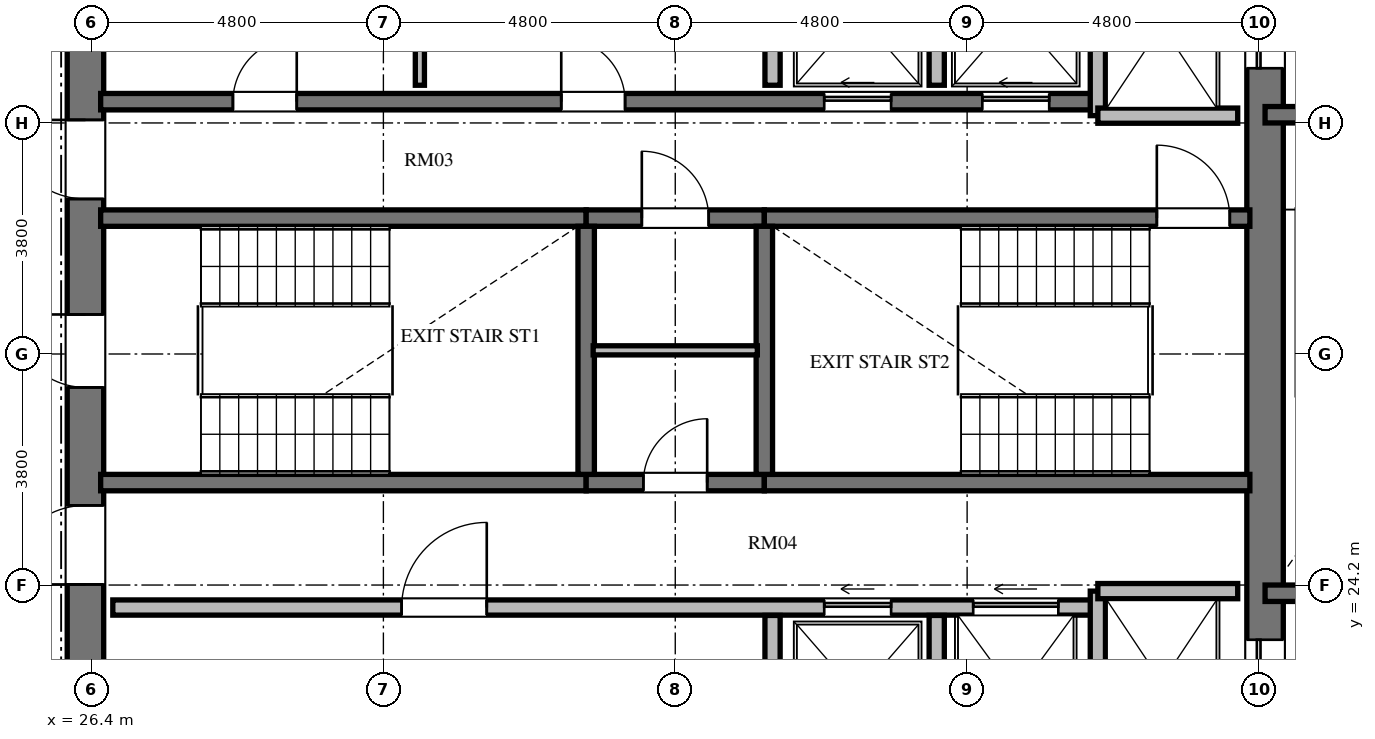
"""IFC4 building model, lengths in metres.
Left out: names, types, materials, properties, quantities, classifications, styles, units other than length and angle.
Written with IfcOpenShell. Run it as: python <this file> out.ifc"""

import sys

from ifc_helpers import new_model, si_unit, direction, frame, frame_2d, origin, place, context, subcontext, project, spatial, rectangle, extrude, element, fill, save


model = new_model("IFC4")
c1 = context("Model", 3, precision=1e-05, world=origin(), true_north=direction((0.0, 1.0)))
c2 = subcontext(c1, "Body", "Model", "MODEL_VIEW")
j1 = project(units=[si_unit("LENGTHUNIT", "METRE"), si_unit("PLANEANGLEUNIT", "RADIAN")], contexts=[c1])
p1 = place(None, origin())
s1 = spatial("IfcSite", under=j1, at=p1, CompositionType="ELEMENT")
p2 = place(p1, origin())
s2 = spatial("IfcBuilding", under=s1, at=p2, CompositionType="ELEMENT")
p3 = place(p2, frame((0.0, 0.0, 224.016)))
s3 = spatial("IfcBuildingStorey", under=s2, at=p3, CompositionType="ELEMENT", Elevation=224.016)
p4 = place(p3, frame((26.3, 20.95, 0.0), z_axis=(0.0, 0.0, 1.0), x_axis=(0.0, 1.0, 0.0)))
e1 = element("IfcWall", 1, at=p4, inside=s3, PredefinedType="SHEAR", context=c2, shape_type="SweptSolid", body=[
    extrude(rectangle(XDim=14.1, YDim=0.6, at=frame_2d((7.05, 0.0))), origin(), (0.0, 0.0, 1.0), 3.648),
])
p5 = place(p4, frame((6.5, 0.0, 0.0)))
e2 = element("IfcOpeningElement", 2, at=p5, cuts=e1, PredefinedType="OPENING", context=c2, shape_type="SweptSolid", body=[
    extrude(rectangle(XDim=1.2, YDim=2.15, at=frame_2d((0.6, 1.075))), frame((0.0, 0.31, 0.0), z_axis=(0.0, -1.0, 0.0), x_axis=(1.0, 0.0, 0.0)), (0.0, 0.0, 1.0), 0.62),
])
p6 = place(p4, frame((9.6, 0.0, 0.0)))
e3 = element("IfcOpeningElement", 3, at=p6, cuts=e1, PredefinedType="OPENING", context=c2, shape_type="SweptSolid", body=[
    extrude(rectangle(XDim=1.3, YDim=2.2, at=frame_2d((0.65, 1.1))), frame((0.0, 0.31, 0.0), z_axis=(0.0, -1.0, 0.0), x_axis=(1.0, 0.0, 0.0)), (0.0, 0.0, 1.0), 0.62),
])
p7 = place(p4, frame((3.26, 0.0, 0.0)))
e4 = element("IfcOpeningElement", 4, at=p7, cuts=e1, PredefinedType="OPENING", context=c2, shape_type="SweptSolid", body=[
    extrude(rectangle(XDim=1.3, YDim=2.2, at=frame_2d((0.65, 1.1))), frame((0.0, 0.31, 0.0), z_axis=(0.0, -1.0, 0.0), x_axis=(1.0, 0.0, 0.0)), (0.0, 0.0, 1.0), 0.62),
])
p8 = place(p3, frame((45.7, 20.95, 0.0), z_axis=(0.0, 0.0, 1.0), x_axis=(0.0, 1.0, 0.0)))
e5 = element("IfcWall", 5, at=p8, inside=s3, PredefinedType="SHEAR", context=c2, shape_type="SweptSolid", body=[
    extrude(rectangle(XDim=14.1, YDim=0.6, at=frame_2d((7.05, 0.0))), origin(), (0.0, 0.0, 1.0), 3.648),
])
p9 = place(p8, frame((11.75, 0.0, 0.0)))
e6 = element("IfcOpeningElement", 6, at=p9, cuts=e5, PredefinedType="OPENING", context=c2, shape_type="SweptSolid", body=[
    extrude(rectangle(XDim=1.4, YDim=2.3, at=frame_2d((0.7, 1.15))), frame((0.0, 0.31, 0.0), z_axis=(0.0, -1.0, 0.0), x_axis=(1.0, 0.0, 0.0)), (0.0, 0.0, 1.0), 0.62),
])
p10 = place(p8, frame((0.95, 0.0, 0.0)))
e7 = element("IfcOpeningElement", 7, at=p10, cuts=e5, PredefinedType="OPENING", context=c2, shape_type="SweptSolid", body=[
    extrude(rectangle(XDim=1.4, YDim=2.3, at=frame_2d((0.7, 1.15))), frame((0.0, 0.31, 0.0), z_axis=(0.0, -1.0, 0.0), x_axis=(1.0, 0.0, 0.0)), (0.0, 0.0, 1.0), 0.62),
])
p11 = place(p3, frame((26.55, 30.235, 0.0), z_axis=(0.0, 0.0, 1.0), x_axis=(1.0, 0.0, 0.0)))
e8 = element("IfcWall", 8, at=p11, inside=s3, PredefinedType="SHEAR", context=c2, shape_type="SweptSolid", body=[
    extrude(rectangle(XDim=7.985, YDim=0.27, at=frame_2d((3.992, 0.0))), origin(), (0.0, 0.0, 1.0), 3.648),
])
p12 = place(p3, frame((34.535, 30.235, 0.0), z_axis=(0.0, 0.0, 1.0), x_axis=(1.0, 0.0, 0.0)))
e9 = element("IfcWall", 9, at=p12, inside=s3, PredefinedType="SHEAR", context=c2, shape_type="SweptSolid", body=[
    extrude(rectangle(XDim=2.93, YDim=0.27, at=frame_2d((1.465, 0.0))), origin(), (0.0, 0.0, 1.0), 3.648),
])
p13 = place(p12, frame((0.915, 0.0, 0.0)))
e10 = element("IfcOpeningElement", 10, at=p13, cuts=e9, PredefinedType="OPENING", context=c2, shape_type="SweptSolid", body=[
    extrude(rectangle(XDim=1.1, YDim=2.15, at=frame_2d((0.55, 1.075))), frame((0.0, 0.145, 0.0), z_axis=(0.0, -1.0, 0.0), x_axis=(1.0, 0.0, 0.0)), (0.0, 0.0, 1.0), 0.29),
])
p14 = place(p3, frame((37.465, 30.235, 0.0), z_axis=(0.0, 0.0, 1.0), x_axis=(1.0, 0.0, 0.0)))
e11 = element("IfcWall", 11, at=p14, inside=s3, PredefinedType="SHEAR", context=c2, shape_type="SweptSolid", body=[
    extrude(rectangle(XDim=7.985, YDim=0.27, at=frame_2d((3.992, 0.0))), origin(), (0.0, 0.0, 1.0), 3.648),
])
p15 = place(p14, frame((6.455, 0.0, 0.0)))
e12 = element("IfcOpeningElement", 12, at=p15, cuts=e11, PredefinedType="OPENING", context=c2, shape_type="SweptSolid", body=[
    extrude(rectangle(XDim=1.2, YDim=2.15, at=frame_2d((0.6, 1.075))), frame((0.0, 0.145, 0.0), z_axis=(0.0, -1.0, 0.0), x_axis=(1.0, 0.0, 0.0)), (0.0, 0.0, 1.0), 0.29),
])
p16 = place(p3, frame((26.55, 25.885, 0.0), z_axis=(0.0, 0.0, 1.0), x_axis=(1.0, 0.0, 0.0)))
e13 = element("IfcWall", 13, at=p16, inside=s3, PredefinedType="SHEAR", context=c2, shape_type="SweptSolid", body=[
    extrude(rectangle(XDim=7.985, YDim=0.27, at=frame_2d((3.992, 0.0))), origin(), (0.0, 0.0, 1.0), 3.648),
])
p17 = place(p3, frame((34.535, 25.885, 0.0), z_axis=(0.0, 0.0, 1.0), x_axis=(1.0, 0.0, 0.0)))
e14 = element("IfcWall", 14, at=p17, inside=s3, PredefinedType="SHEAR", context=c2, shape_type="SweptSolid", body=[
    extrude(rectangle(XDim=2.93, YDim=0.27, at=frame_2d((1.465, 0.0))), origin(), (0.0, 0.0, 1.0), 3.648),
])
p18 = place(p17, frame((0.94, 0.0, 0.0)))
e15 = element("IfcOpeningElement", 15, at=p18, cuts=e14, PredefinedType="OPENING", context=c2, shape_type="SweptSolid", body=[
    extrude(rectangle(XDim=1.05, YDim=2.15, at=frame_2d((0.525, 1.075))), frame((0.0, 0.145, 0.0), z_axis=(0.0, -1.0, 0.0), x_axis=(1.0, 0.0, 0.0)), (0.0, 0.0, 1.0), 0.29),
])
p19 = place(p3, frame((37.465, 25.885, 0.0), z_axis=(0.0, 0.0, 1.0), x_axis=(1.0, 0.0, 0.0)))
e16 = element("IfcWall", 16, at=p19, inside=s3, PredefinedType="SHEAR", context=c2, shape_type="SweptSolid", body=[
    extrude(rectangle(XDim=7.985, YDim=0.27, at=frame_2d((3.992, 0.0))), origin(), (0.0, 0.0, 1.0), 3.648),
])
for number, where, z_axis, x_axis in (
    (17, (34.535, 26.02, 0.0), (0.0, 0.0, 1.0), (0.0, 1.0, 0.0)),
    (18, (37.465, 26.02, 0.0), (0.0, 0.0, 1.0), (0.0, 1.0, 0.0)),
):
    element("IfcWall", number, at=place(p3, frame(where, z_axis=z_axis, x_axis=x_axis)), inside=s3, PredefinedType="SHEAR", context=c2, shape_type="SweptSolid", body=[
        extrude(rectangle(XDim=4.08, YDim=0.27, at=frame_2d((2.04, 0.0))), origin(), (0.0, 0.0, 1.0), 3.648),
    ])
p20 = place(p3, frame((34.65, 28.06, 0.0), z_axis=(0.0, 0.0, 1.0), x_axis=(1.0, 0.0, 0.0)))
e19 = element("IfcWall", 19, at=p20, inside=s3, PredefinedType="PARTITIONING", context=c2, shape_type="SweptSolid", body=[
    extrude(rectangle(XDim=2.7, YDim=0.15, at=frame_2d((1.35, 0.0))), origin(), (0.0, 0.0, 1.0), 3.448),
])
p21 = place(p3, frame((26.55, 32.15, 0.0), z_axis=(0.0, 0.0, 1.0), x_axis=(1.0, 0.0, 0.0)))
e20 = element("IfcWall", 20, at=p21, inside=s3, PredefinedType="SHEAR", context=c2, shape_type="SweptSolid", body=[
    extrude(rectangle(XDim=16.4, YDim=0.27, at=frame_2d((8.2, 0.0))), origin(), (0.0, 0.0, 1.0), 3.648),
])
p22 = place(p21, frame((2.175, 0.0, 0.0)))
e21 = element("IfcOpeningElement", 21, at=p22, cuts=e20, PredefinedType="OPENING", context=c2, shape_type="SweptSolid", body=[
    extrude(rectangle(XDim=1.05, YDim=2.15, at=frame_2d((0.525, 1.075))), frame((0.0, 0.145, 0.0), z_axis=(0.0, -1.0, 0.0), x_axis=(1.0, 0.0, 0.0)), (0.0, 0.0, 1.0), 0.29),
])
p23 = place(p21, frame((7.575, 0.0, 0.0)))
e22 = element("IfcOpeningElement", 22, at=p23, cuts=e20, PredefinedType="OPENING", context=c2, shape_type="SweptSolid", body=[
    extrude(rectangle(XDim=1.05, YDim=2.15, at=frame_2d((0.525, 1.075))), frame((0.0, 0.145, 0.0), z_axis=(0.0, -1.0, 0.0), x_axis=(1.0, 0.0, 0.0)), (0.0, 0.0, 1.0), 0.29),
])
p24 = place(p21, frame((11.9, 0.0, 0.0)))
e23 = element("IfcOpeningElement", 23, at=p24, cuts=e20, PredefinedType="OPENING", context=c2, shape_type="SweptSolid", body=[
    extrude(rectangle(XDim=1.1, YDim=2.2, at=frame_2d((0.55, 1.1))), frame((0.0, 0.145, 0.0), z_axis=(0.0, -1.0, 0.0), x_axis=(1.0, 0.0, 0.0)), (0.0, 0.0, 1.0), 0.29),
])
p25 = place(p21, frame((14.5, 0.0, 0.0)))
e24 = element("IfcOpeningElement", 24, at=p25, cuts=e20, PredefinedType="OPENING", context=c2, shape_type="SweptSolid", body=[
    extrude(rectangle(XDim=1.1, YDim=2.2, at=frame_2d((0.55, 1.1))), frame((0.0, 0.145, 0.0), z_axis=(0.0, -1.0, 0.0), x_axis=(1.0, 0.0, 0.0)), (0.0, 0.0, 1.0), 0.29),
])
p26 = place(p3, frame((26.75, 23.83, 0.0), z_axis=(0.0, 0.0, 1.0), x_axis=(1.0, 0.0, 0.0)))
e25 = element("IfcWall", 25, at=p26, inside=s3, PredefinedType="SOLIDWALL", context=c2, shape_type="SweptSolid", body=[
    extrude(rectangle(XDim=16.2, YDim=0.25, at=frame_2d((8.1, 0.0))), origin(), (0.0, 0.0, 1.0), 3.448),
])
p27 = place(p26, frame((4.75, 0.0, 0.0)))
e26 = element("IfcOpeningElement", 26, at=p27, cuts=e25, PredefinedType="OPENING", context=c2, shape_type="SweptSolid", body=[
    extrude(rectangle(XDim=1.4, YDim=2.2, at=frame_2d((0.7, 1.1))), frame((0.0, 0.135, 0.0), z_axis=(0.0, -1.0, 0.0), x_axis=(1.0, 0.0, 0.0)), (0.0, 0.0, 1.0), 0.27),
])
p28 = place(p26, frame((11.7, 0.0, 0.0)))
e27 = element("IfcOpeningElement", 27, at=p28, cuts=e25, PredefinedType="OPENING", context=c2, shape_type="SweptSolid", body=[
    extrude(rectangle(XDim=1.1, YDim=2.2, at=frame_2d((0.55, 1.1))), frame((0.0, 0.135, 0.0), z_axis=(0.0, -1.0, 0.0), x_axis=(1.0, 0.0, 0.0)), (0.0, 0.0, 1.0), 0.27),
])
p29 = place(p26, frame((14.15, 0.0, 0.0)))
e28 = element("IfcOpeningElement", 28, at=p29, cuts=e25, PredefinedType="OPENING", context=c2, shape_type="SweptSolid", body=[
    extrude(rectangle(XDim=1.4, YDim=2.3, at=frame_2d((0.7, 1.15))), frame((0.0, 0.135, 0.0), z_axis=(0.0, -1.0, 0.0), x_axis=(1.0, 0.0, 0.0)), (0.0, 0.0, 1.0), 0.27),
])
p30 = place(p3, frame((42.95, 31.92, 0.0), z_axis=(0.0, 0.0, 1.0), x_axis=(0.0, 1.0, 0.0)))
e29 = element("IfcWall", 29, at=p30, inside=s3, PredefinedType="SOLIDWALL", context=c2, shape_type="SweptSolid", body=[
    extrude(rectangle(XDim=3.18, YDim=0.25, at=frame_2d((1.59, 0.0))), origin(), (0.0, 0.0, 1.0), 3.448),
])
p31 = place(p3, frame((42.95, 31.92, 0.0), z_axis=(0.0, 0.0, 1.0), x_axis=(1.0, 0.0, 0.0)))
e30 = element("IfcWall", 30, at=p31, inside=s3, PredefinedType="SOLIDWALL", context=c2, shape_type="SweptSolid", body=[
    extrude(rectangle(XDim=2.3, YDim=0.25, at=frame_2d((1.15, 0.0))), origin(), (0.0, 0.0, 1.0), 3.448),
])
p32 = place(p3, frame((42.95, 20.9, 0.0), z_axis=(0.0, 0.0, 1.0), x_axis=(0.0, 1.0, 0.0)))
e31 = element("IfcWall", 31, at=p32, inside=s3, PredefinedType="SOLIDWALL", context=c2, shape_type="SweptSolid", body=[
    extrude(rectangle(XDim=3.2, YDim=0.25, at=frame_2d((1.6, 0.0))), origin(), (0.0, 0.0, 1.0), 3.448),
])
p33 = place(p3, frame((42.95, 24.1, 0.0), z_axis=(0.0, 0.0, 1.0), x_axis=(1.0, 0.0, 0.0)))
e32 = element("IfcWall", 32, at=p33, inside=s3, PredefinedType="SOLIDWALL", context=c2, shape_type="SweptSolid", body=[
    extrude(rectangle(XDim=2.3, YDim=0.25, at=frame_2d((1.15, 0.0))), origin(), (0.0, 0.0, 1.0), 3.448),
])
p34 = place(p3, frame((37.6, 32.42, 0.0), z_axis=(0.0, 0.0, 1.0), x_axis=(0.0, 1.0, 0.0)))
e33 = element("IfcWall", 33, at=p34, inside=s3, PredefinedType="SOLIDWALL", context=c2, shape_type="SweptSolid", body=[
    extrude(rectangle(XDim=2.68, YDim=0.25, at=frame_2d((1.34, 0.0))), origin(), (0.0, 0.0, 1.0), 3.448),
])
p35 = place(p3, frame((37.6, 20.9, 0.0), z_axis=(0.0, 0.0, 1.0), x_axis=(0.0, 1.0, 0.0)))
e34 = element("IfcWall", 34, at=p35, inside=s3, PredefinedType="SOLIDWALL", context=c2, shape_type="SweptSolid", body=[
    extrude(rectangle(XDim=2.8, YDim=0.25, at=frame_2d((1.4, 0.0))), origin(), (0.0, 0.0, 1.0), 3.448),
])
p36 = place(p3, frame((40.3, 32.42, 0.0), z_axis=(0.0, 0.0, 1.0), x_axis=(0.0, 1.0, 0.0)))
e35 = element("IfcWall", 35, at=p36, inside=s3, PredefinedType="SOLIDWALL", context=c2, shape_type="SweptSolid", body=[
    extrude(rectangle(XDim=2.68, YDim=0.25, at=frame_2d((1.34, 0.0))), origin(), (0.0, 0.0, 1.0), 3.448),
])
p37 = place(p3, frame((40.3, 20.9, 0.0), z_axis=(0.0, 0.0, 1.0), x_axis=(0.0, 1.0, 0.0)))
e36 = element("IfcWall", 36, at=p37, inside=s3, PredefinedType="SOLIDWALL", context=c2, shape_type="SweptSolid", body=[
    extrude(rectangle(XDim=2.8, YDim=0.25, at=frame_2d((1.4, 0.0))), origin(), (0.0, 0.0, 1.0), 3.448),
])
p38 = place(p3, frame((31.8, 32.42, 0.0), z_axis=(0.0, 0.0, 1.0), x_axis=(0.0, 1.0, 0.0)))
e37 = element("IfcWall", 37, at=p38, inside=s3, PredefinedType="PARTITIONING", context=c2, shape_type="SweptSolid", body=[
    extrude(rectangle(XDim=2.68, YDim=0.15, at=frame_2d((1.34, 0.0))), origin(), (0.0, 0.0, 1.0), 3.448),
])
for number, where, z_axis, x_axis in (
    (38, (45.7, 31.935, 0.0), (0.0, 0.0, 1.0), (1.0, 0.0, 0.0)),
    (39, (45.7, 24.065, 0.0), (0.0, 0.0, 1.0), (1.0, 0.0, 0.0)),
):
    element("IfcWall", number, at=place(p3, frame(where, z_axis=z_axis, x_axis=x_axis)), inside=s3, PredefinedType="SHEAR", context=c2, shape_type="SweptSolid", body=[
        extrude(rectangle(XDim=4.715, YDim=0.27, at=frame_2d((2.357, 0.0))), origin(), (0.0, 0.0, 1.0), 3.648),
    ])
p39 = place(p5, origin())
e40 = element("IfcDoor", 40, at=p39, inside=s3, OperationType="SINGLE_SWING_RIGHT", PredefinedType="DOOR", context=c2, shape_type="SweptSolid", body=[
    extrude(rectangle(XDim=1.2, YDim=2.15, at=frame_2d((0.6, 1.075))), frame((0.0, 0.025, 0.0), z_axis=(0.0, -1.0, 0.0), x_axis=(1.0, 0.0, 0.0)), (0.0, 0.0, 1.0), 0.05),
])
fill(e2, e40)
p40 = place(p15, origin())
e41 = element("IfcDoor", 41, at=p40, inside=s3, OperationType="SINGLE_SWING_LEFT", PredefinedType="DOOR", context=c2, shape_type="SweptSolid", body=[
    extrude(rectangle(XDim=1.2, YDim=2.15, at=frame_2d((0.6, 1.075))), frame((0.0, 0.025, 0.0), z_axis=(0.0, -1.0, 0.0), x_axis=(1.0, 0.0, 0.0)), (0.0, 0.0, 1.0), 0.05),
])
fill(e12, e41)
p41 = place(p18, origin())
e42 = element("IfcDoor", 42, at=p41, inside=s3, OperationType="SINGLE_SWING_RIGHT", PredefinedType="DOOR", context=c2, shape_type="SweptSolid", body=[
    extrude(rectangle(XDim=1.05, YDim=2.15, at=frame_2d((0.525, 1.075))), frame((0.0, 0.025, 0.0), z_axis=(0.0, -1.0, 0.0), x_axis=(1.0, 0.0, 0.0)), (0.0, 0.0, 1.0), 0.05),
])
fill(e15, e42)
p42 = place(p13, origin())
e43 = element("IfcDoor", 43, at=p42, inside=s3, OperationType="SINGLE_SWING_LEFT", PredefinedType="DOOR", context=c2, shape_type="SweptSolid", body=[
    extrude(rectangle(XDim=1.1, YDim=2.15, at=frame_2d((0.55, 1.075))), frame((0.0, 0.025, 0.0), z_axis=(0.0, -1.0, 0.0), x_axis=(1.0, 0.0, 0.0)), (0.0, 0.0, 1.0), 0.05),
])
fill(e10, e43)
p43 = place(p6, origin())
e44 = element("IfcDoor", 44, at=p43, inside=s3, OperationType="SINGLE_SWING_RIGHT", PredefinedType="DOOR", context=c2, shape_type="SweptSolid", body=[
    extrude(rectangle(XDim=1.3, YDim=2.2, at=frame_2d((0.65, 1.1))), frame((0.0, 0.025, 0.0), z_axis=(0.0, -1.0, 0.0), x_axis=(1.0, 0.0, 0.0)), (0.0, 0.0, 1.0), 0.05),
])
fill(e3, e44)
p44 = place(p7, origin())
e45 = element("IfcDoor", 45, at=p44, inside=s3, OperationType="SINGLE_SWING_LEFT", PredefinedType="DOOR", context=c2, shape_type="SweptSolid", body=[
    extrude(rectangle(XDim=1.3, YDim=2.2, at=frame_2d((0.65, 1.1))), frame((0.0, 0.025, 0.0), z_axis=(0.0, -1.0, 0.0), x_axis=(1.0, 0.0, 0.0)), (0.0, 0.0, 1.0), 0.05),
])
fill(e4, e45)
p45 = place(p22, origin())
e46 = element("IfcDoor", 46, at=p45, inside=s3, OperationType="SINGLE_SWING_RIGHT", PredefinedType="DOOR", context=c2, shape_type="SweptSolid", body=[
    extrude(rectangle(XDim=1.05, YDim=2.15, at=frame_2d((0.525, 1.075))), frame((0.0, 0.025, 0.0), z_axis=(0.0, -1.0, 0.0), x_axis=(1.0, 0.0, 0.0)), (0.0, 0.0, 1.0), 0.05),
])
fill(e21, e46)
p46 = place(p23, origin())
e47 = element("IfcDoor", 47, at=p46, inside=s3, OperationType="SINGLE_SWING_LEFT", PredefinedType="DOOR", context=c2, shape_type="SweptSolid", body=[
    extrude(rectangle(XDim=1.05, YDim=2.15, at=frame_2d((0.525, 1.075))), frame((0.0, 0.025, 0.0), z_axis=(0.0, -1.0, 0.0), x_axis=(1.0, 0.0, 0.0)), (0.0, 0.0, 1.0), 0.05),
])
fill(e22, e47)
p47 = place(p27, origin())
e48 = element("IfcDoor", 48, at=p47, inside=s3, OperationType="SINGLE_SWING_RIGHT", PredefinedType="DOOR", context=c2, shape_type="SweptSolid", body=[
    extrude(rectangle(XDim=1.4, YDim=2.2, at=frame_2d((0.7, 1.1))), frame((0.0, 0.025, 0.0), z_axis=(0.0, -1.0, 0.0), x_axis=(1.0, 0.0, 0.0)), (0.0, 0.0, 1.0), 0.05),
])
fill(e26, e48)
p48 = place(p24, origin())
e49 = element("IfcDoor", 49, at=p48, inside=s3, OperationType="SLIDING_TO_LEFT", PredefinedType="DOOR", context=c2, shape_type="SweptSolid", body=[
    extrude(rectangle(XDim=1.1, YDim=2.2, at=frame_2d((0.55, 1.1))), frame((0.0, 0.025, 0.0), z_axis=(0.0, -1.0, 0.0), x_axis=(1.0, 0.0, 0.0)), (0.0, 0.0, 1.0), 0.05),
])
fill(e23, e49)
p49 = place(p25, origin())
e50 = element("IfcDoor", 50, at=p49, inside=s3, OperationType="SLIDING_TO_LEFT", PredefinedType="DOOR", context=c2, shape_type="SweptSolid", body=[
    extrude(rectangle(XDim=1.1, YDim=2.2, at=frame_2d((0.55, 1.1))), frame((0.0, 0.025, 0.0), z_axis=(0.0, -1.0, 0.0), x_axis=(1.0, 0.0, 0.0)), (0.0, 0.0, 1.0), 0.05),
])
fill(e24, e50)
p50 = place(p28, origin())
e51 = element("IfcDoor", 51, at=p50, inside=s3, OperationType="SLIDING_TO_LEFT", PredefinedType="DOOR", context=c2, shape_type="SweptSolid", body=[
    extrude(rectangle(XDim=1.1, YDim=2.2, at=frame_2d((0.55, 1.1))), frame((0.0, 0.025, 0.0), z_axis=(0.0, -1.0, 0.0), x_axis=(1.0, 0.0, 0.0)), (0.0, 0.0, 1.0), 0.05),
])
fill(e27, e51)
p51 = place(p9, origin())
e52 = element("IfcDoor", 52, at=p51, inside=s3, OperationType="SLIDING_TO_LEFT", PredefinedType="DOOR", context=c2, shape_type="SweptSolid", body=[
    extrude(rectangle(XDim=1.4, YDim=2.3, at=frame_2d((0.7, 1.15))), frame((0.0, 0.025, 0.0), z_axis=(0.0, -1.0, 0.0), x_axis=(1.0, 0.0, 0.0)), (0.0, 0.0, 1.0), 0.05),
])
fill(e6, e52)
p52 = place(p10, origin())
e53 = element("IfcDoor", 53, at=p52, inside=s3, OperationType="SLIDING_TO_LEFT", PredefinedType="DOOR", context=c2, shape_type="SweptSolid", body=[
    extrude(rectangle(XDim=1.4, YDim=2.3, at=frame_2d((0.7, 1.15))), frame((0.0, 0.025, 0.0), z_axis=(0.0, -1.0, 0.0), x_axis=(1.0, 0.0, 0.0)), (0.0, 0.0, 1.0), 0.05),
])
fill(e7, e53)
p53 = place(p29, origin())
e54 = element("IfcDoor", 54, at=p53, inside=s3, OperationType="SLIDING_TO_LEFT", PredefinedType="DOOR", context=c2, shape_type="SweptSolid", body=[
    extrude(rectangle(XDim=1.4, YDim=2.3, at=frame_2d((0.7, 1.15))), frame((0.0, 0.025, 0.0), z_axis=(0.0, -1.0, 0.0), x_axis=(1.0, 0.0, 0.0)), (0.0, 0.0, 1.0), 0.05),
])
fill(e28, e54)
save(model, sys.argv[1])
